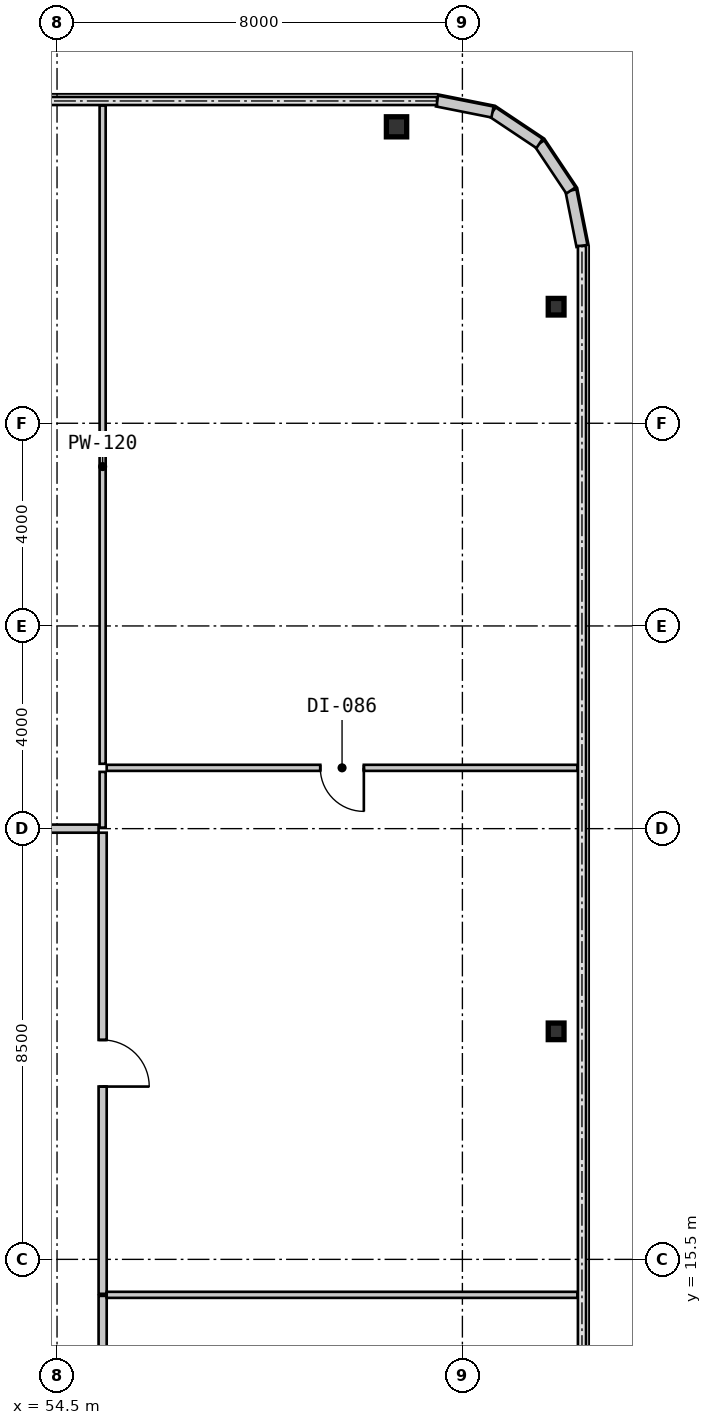
"""IFC4 building model, lengths in metres.
Left out: names, types, materials, properties, quantities, classifications, styles, units other than length and angle.
Written with IfcOpenShell. Run it as: python <this file> out.ifc"""

import sys

from ifc_helpers import new_model, si_unit, direction, frame, frame_2d, origin, origin_2d, place, context, subcontext, project, spatial, rectangle, i_section, extrude, source, transform, mapped, element, fill, save


model = new_model("IFC4")
c1 = context("Model", 3, precision=1e-05, world=origin(), true_north=direction((0.0, 1.0)))
c2 = subcontext(c1, "Body", "Model", "MODEL_VIEW")
j1 = project(units=[si_unit("LENGTHUNIT", "METRE"), si_unit("PLANEANGLEUNIT", "RADIAN")], contexts=[c1])
p1 = place(None, origin())
s1 = spatial("IfcSite", under=j1, at=p1, CompositionType="ELEMENT")
p2 = place(p1, origin())
s2 = spatial("IfcBuilding", under=s1, at=p2, CompositionType="ELEMENT")
p3 = place(p2, frame((0.0, 0.0, 38.85)))
s3 = spatial("IfcBuildingStorey", under=s2, at=p3, CompositionType="ELEMENT", Elevation=38.85)
m1 = source(origin(), c2, "Body", "SweptSolid", [
    extrude(i_section(OverallWidth=0.4, OverallDepth=0.396, WebThickness=0.022, FlangeThickness=0.034, at=origin_2d()), origin(), (0.0, 0.0, 1.0), 3.15),
])
p4 = place(p3, frame((61.2, 37.85, 0.0), z_axis=(0.0, 0.0, 1.0), x_axis=(1.0, 0.0, 0.0)))
e1 = element("IfcColumn", 1, at=p4, inside=s3, PredefinedType="COLUMN", context=c2, shape_type="MappedRepresentation", body=[
    mapped(m1, transform((0.0, 0.0, 0.0), scale=1.0)),
])
m2 = source(origin(), c2, "Body", "SweptSolid", [
    extrude(i_section(OverallWidth=0.311, OverallDepth=0.327, WebThickness=0.016, FlangeThickness=0.025, at=origin_2d()), origin(), (0.0, 0.0, 1.0), 3.15),
])
for number, where, z_axis, x_axis in (
    (2, (64.35, 20.0, 0.0), (0.0, 0.0, 1.0), (1.0, 0.0, 0.0)),
    (3, (64.35, 34.3, 0.0), (0.0, 0.0, 1.0), (1.0, 0.0, 0.0)),
):
    element("IfcColumn", number, at=place(p3, frame(where, z_axis=z_axis, x_axis=x_axis)), inside=s3, PredefinedType="COLUMN", context=c2, shape_type="MappedRepresentation", body=[
        mapped(m2, transform((0.0, 0.0, 0.0), scale=1.0)),
    ])
m3 = source(origin(), c2, "Body", "SweptSolid", [
    extrude(rectangle(XDim=1.116, YDim=0.22, at=frame_2d((0.558, 0.0))), origin(), (0.0, 0.0, 1.0), 2.93),
])
for number, where, z_axis, x_axis in (
    (4, (64.86, 35.5, 0.0), (0.0, 0.0, 1.0), (-0.195, 0.981, 0.0)),
    (5, (64.642, 36.594, 0.0), (0.0, 0.0, 1.0), (-0.556, 0.831, 0.0)),
    (6, (64.022, 37.522, 0.0), (0.0, 0.0, 1.0), (-0.831, 0.556, 0.0)),
    (7, (63.094, 38.142, 0.0), (0.0, 0.0, 1.0), (-0.981, 0.195, 0.0)),
):
    element("IfcWall", number, at=place(p3, frame(where, z_axis=z_axis, x_axis=x_axis)), inside=s3, PredefinedType="SOLIDWALL", context=c2, shape_type="MappedRepresentation", body=[
        mapped(m3, transform((0.0, 0.0, 0.0), scale=1.0)),
    ])
m4 = source(origin(), c2, "Body", "SweptSolid", [
    extrude(rectangle(XDim=5.5, YDim=0.16, at=frame_2d((2.75, 0.0))), origin(), (0.0, 0.0, 1.0), 2.93),
])
p5 = place(p3, frame((55.4, 14.78, 0.0), z_axis=(0.0, 0.0, 1.0), x_axis=(0.0, -1.0, 0.0)))
e8 = element("IfcWall", 8, at=p5, inside=s3, PredefinedType="PARTITIONING", context=c2, shape_type="MappedRepresentation", body=[
    mapped(m4, transform((0.0, 0.0, 0.0), scale=1.0)),
])
m5 = source(origin(), c2, "Body", "SweptSolid", [
    extrude(rectangle(XDim=0.92, YDim=2.1, at=frame_2d((0.46, 1.05))), frame((0.0, 0.09, 0.0), z_axis=(0.0, -1.0, 0.0), x_axis=(1.0, 0.0, 0.0)), (0.0, 0.0, 1.0), 0.18),
])
p6 = place(p5, frame((2.29, 0.0, 0.0)))
e9 = element("IfcOpeningElement", 9, at=p6, cuts=e8, PredefinedType="OPENING", context=c2, shape_type="MappedRepresentation", body=[
    mapped(m5, transform((0.0, 0.0, 0.0), scale=1.0)),
])
m6 = source(origin(), c2, "Body", "SweptSolid", [
    extrude(rectangle(XDim=9.1, YDim=0.16, at=frame_2d((4.55, 0.0))), origin(), (0.0, 0.0, 1.0), 2.93),
])
p7 = place(p3, frame((55.4, 23.92, 0.0), z_axis=(0.0, 0.0, 1.0), x_axis=(0.0, -1.0, 0.0)))
e10 = element("IfcWall", 10, at=p7, inside=s3, PredefinedType="PARTITIONING", context=c2, shape_type="MappedRepresentation", body=[
    mapped(m6, transform((0.0, 0.0, 0.0), scale=1.0)),
])
p8 = place(p7, frame((4.09, 0.0, 0.0)))
e11 = element("IfcOpeningElement", 11, at=p8, cuts=e10, PredefinedType="OPENING", context=c2, shape_type="MappedRepresentation", body=[
    mapped(m5, transform((0.0, 0.0, 0.0), scale=1.0)),
])
m7 = source(origin(), c2, "Body", "SweptSolid", [
    extrude(rectangle(XDim=4.13, YDim=0.16, at=frame_2d((2.065, 0.0))), origin(), (0.0, 0.0, 1.0), 2.93),
])
p9 = place(p3, frame((51.19, 24.0, 0.0), z_axis=(0.0, 0.0, 1.0), x_axis=(1.0, 0.0, 0.0)))
e12 = element("IfcWall", 12, at=p9, inside=s3, PredefinedType="PARTITIONING", context=c2, shape_type="MappedRepresentation", body=[
    mapped(m7, transform((0.0, 0.0, 0.0), scale=1.0)),
])
m8 = source(origin(), c2, "Body", "SweptSolid", [
    extrude(rectangle(XDim=9.29, YDim=0.12, at=frame_2d((4.645, 0.0))), origin(), (0.0, 0.0, 1.0), 2.93),
])
p10 = place(p3, frame((55.48, 14.8, 0.0), z_axis=(0.0, 0.0, 1.0), x_axis=(1.0, 0.0, 0.0)))
e13 = element("IfcWall", 13, at=p10, inside=s3, PredefinedType="PARTITIONING", context=c2, shape_type="MappedRepresentation", body=[
    mapped(m8, transform((0.0, 0.0, 0.0), scale=1.0)),
])
p11 = place(p3, frame((55.48, 25.2, 0.0), z_axis=(0.0, 0.0, 1.0), x_axis=(1.0, 0.0, 0.0)))
e14 = element("IfcWall", 14, at=p11, inside=s3, PredefinedType="PARTITIONING", context=c2, shape_type="MappedRepresentation", body=[
    mapped(m8, transform((0.0, 0.0, 0.0), scale=1.0)),
])
m9 = source(origin(), c2, "Body", "SweptSolid", [
    extrude(rectangle(XDim=0.86, YDim=2.1, at=frame_2d((0.43, 1.05))), frame((0.0, 0.07, 0.0), z_axis=(0.0, -1.0, 0.0), x_axis=(1.0, 0.0, 0.0)), (0.0, 0.0, 1.0), 0.14),
])
p12 = place(p11, frame((4.215, 0.0, 0.0)))
e15 = element("IfcOpeningElement", 15, at=p12, cuts=e14, PredefinedType="OPENING", context=c2, shape_type="MappedRepresentation", body=[
    mapped(m9, transform((0.0, 0.0, 0.0), scale=1.0)),
])
m10 = source(origin(), c2, "Body", "SweptSolid", [
    extrude(rectangle(XDim=1.1, YDim=0.12, at=frame_2d((0.55, 0.0))), origin(), (0.0, 0.0, 1.0), 2.93),
])
p13 = place(p3, frame((55.4, 24.02, 0.0), z_axis=(0.0, 0.0, 1.0), x_axis=(0.0, 1.0, 0.0)))
e16 = element("IfcWall", 16, at=p13, inside=s3, PredefinedType="PARTITIONING", context=c2, shape_type="MappedRepresentation", body=[
    mapped(m10, transform((0.0, 0.0, 0.0), scale=1.0)),
])
m11 = source(origin(), c2, "Body", "SweptSolid", [
    extrude(rectangle(XDim=12.99, YDim=0.12, at=frame_2d((6.495, 0.0))), origin(), (0.0, 0.0, 1.0), 2.93),
])
p14 = place(p3, frame((55.4, 25.28, 0.0), z_axis=(0.0, 0.0, 1.0), x_axis=(0.0, 1.0, 0.0)))
e17 = element("IfcWall", 17, at=p14, inside=s3, PredefinedType="PARTITIONING", context=c2, shape_type="MappedRepresentation", body=[
    mapped(m11, transform((0.0, 0.0, 0.0), scale=1.0)),
])
m12 = source(origin(), c2, "Body", "SweptSolid", [
    extrude(rectangle(XDim=0.92, YDim=2.1, at=frame_2d((0.46, 1.05))), frame((0.0, 0.025, 0.0), z_axis=(0.0, -1.0, 0.0), x_axis=(1.0, 0.0, 0.0)), (0.0, 0.0, 1.0), 0.05),
])
p15 = place(p8, origin())
e18 = element("IfcDoor", 18, at=p15, inside=s3, OperationType="SINGLE_SWING_RIGHT", PredefinedType="DOOR", context=c2, shape_type="MappedRepresentation", body=[
    mapped(m12, transform((0.0, 0.0, 0.0), scale=1.0)),
])
fill(e11, e18)
m13 = source(origin(), c2, "Body", "SweptSolid", [
    extrude(rectangle(XDim=0.86, YDim=2.1, at=frame_2d((0.43, 1.05))), frame((0.0, 0.025, 0.0), z_axis=(0.0, -1.0, 0.0), x_axis=(1.0, 0.0, 0.0)), (0.0, 0.0, 1.0), 0.05),
])
p16 = place(p12, frame((0.86, 0.0, 0.0), z_axis=(0.0, 0.0, 1.0), x_axis=(-1.0, 0.0, 0.0)))
e19 = element("IfcDoor", 19, at=p16, inside=s3, OperationType="SINGLE_SWING_LEFT", PredefinedType="DOOR", context=c2, shape_type="MappedRepresentation", body=[
    mapped(m13, transform((0.0, 0.0, 0.0), scale=1.0)),
])
fill(e15, e19)
save(model, sys.argv[1])
